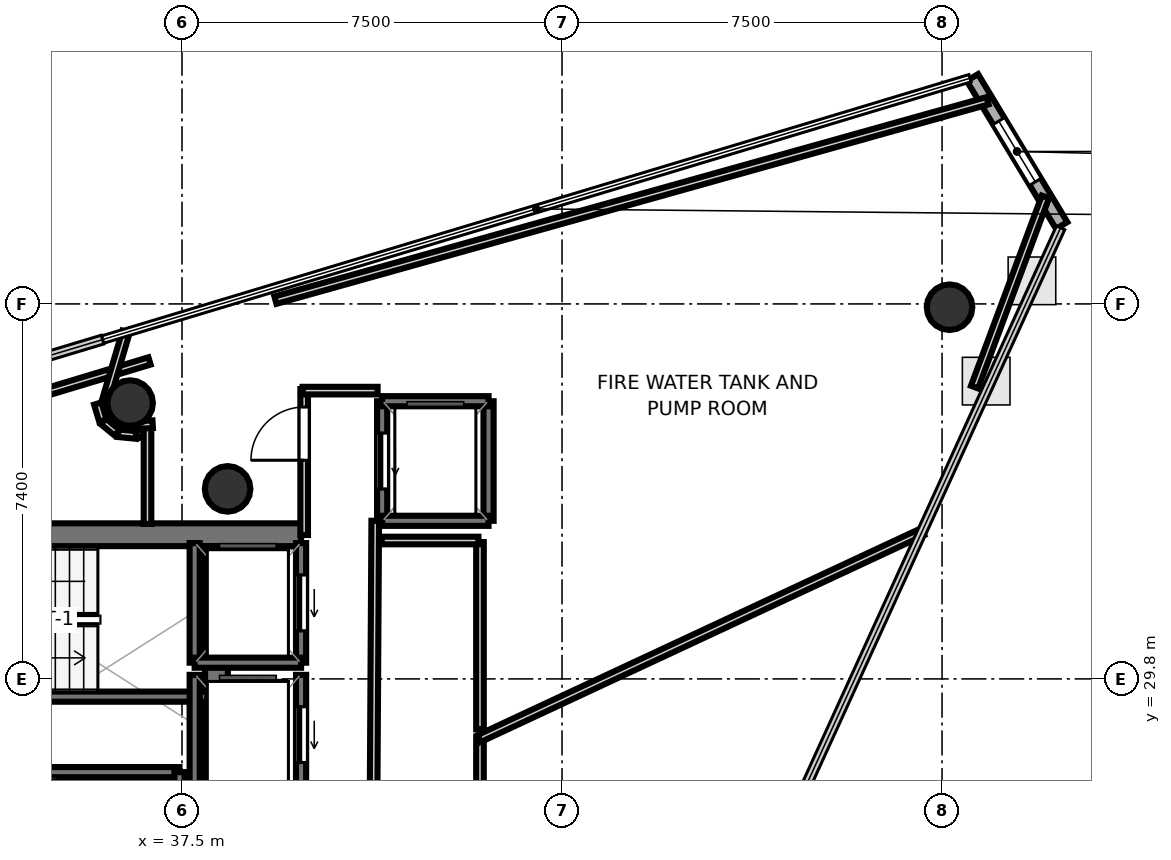
"""IFC4 building model, lengths in metres.
Left out: names, types, materials, properties, quantities, classifications, styles, units other than length and angle.
Written with IfcOpenShell. Run it as: python <this file> out.ifc"""

import sys

from ifc_helpers import new_model, si_unit, direction, frame, frame_2d, origin, origin_2d, place, context, subcontext, project, spatial, rectangle, hollow_circle, extrude, element, fill, save


model = new_model("IFC4")
c1 = context("Model", 3, precision=1e-05, world=origin(), true_north=direction((0.0, 1.0)))
c2 = subcontext(c1, "Body", "Model", "MODEL_VIEW")
j1 = project(units=[si_unit("LENGTHUNIT", "METRE"), si_unit("PLANEANGLEUNIT", "RADIAN")], contexts=[c1])
p1 = place(None, origin())
s1 = spatial("IfcSite", under=j1, at=p1, CompositionType="ELEMENT")
p2 = place(p1, origin())
s2 = spatial("IfcBuilding", under=s1, at=p2, CompositionType="ELEMENT")
p3 = place(p2, frame((0.0, 0.0, 321.3)))
s3 = spatial("IfcBuildingStorey", under=s2, at=p3, CompositionType="ELEMENT", Elevation=321.3)
p4 = place(p3, frame((29.33, 32.645, 0.0), z_axis=(0.0, 0.0, 1.0), x_axis=(1.0, 0.0, 0.0)))
e1 = element("IfcWall", 1, at=p4, inside=s3, PredefinedType="SHEAR", context=c2, shape_type="SweptSolid", body=[
    extrude(rectangle(XDim=10.52, YDim=0.45, at=frame_2d((5.26, 0.0))), origin(), (0.0, 0.0, 1.0), 4.42),
])
p5 = place(p4, frame((0.895, 0.0, 0.0)))
e2 = element("IfcOpeningElement", 2, at=p5, cuts=e1, PredefinedType="OPENING", context=c2, shape_type="SweptSolid", body=[
    extrude(rectangle(XDim=1.25, YDim=2.15, at=frame_2d((0.625, 1.075))), frame((0.0, 0.235, 0.0), z_axis=(0.0, -1.0, 0.0), x_axis=(1.0, 0.0, 0.0)), (0.0, 0.0, 1.0), 0.47),
])
p6 = place(p3, frame((38.18, 24.98, 0.0), z_axis=(0.0, 0.0, 1.0), x_axis=(0.0, 1.0, 0.0)))
e3 = element("IfcWall", 3, at=p6, inside=s3, PredefinedType="SHEAR", context=c2, shape_type="SweptSolid", body=[
    extrude(rectangle(XDim=7.44, YDim=0.45, at=frame_2d((3.72, 0.0))), origin(), (0.0, 0.0, 1.0), 4.42),
])
for number, where, z_axis, x_axis in (
    (4, (38.4, 33.55, 0.0), (0.0, 0.0, 1.0), (1.0, 0.0, 0.0)),
    (5, (52.648, 37.135, 0.0), (0.0, 0.0, 1.0), (1.0, 0.0, 0.0)),
    (6, (36.476, 35.243, 0.0), (0.0, 0.0, 1.0), (1.0, 0.0, 0.0)),
):
    element("IfcColumn", number, at=place(p3, frame(where, z_axis=z_axis, x_axis=x_axis)), inside=s3, PredefinedType="COLUMN", context=c2, shape_type="SweptSolid", body=[
        extrude(hollow_circle(Radius=0.45, WallThickness=0.025, at=origin_2d()), origin(), (0.0, 0.0, 1.0), 4.6),
    ])
p7 = place(p3, frame((54.861, 38.748, 0.0), z_axis=(0.0, 0.0, 1.0), x_axis=(-0.516431513538, 0.856328495278, 0.0)))
e7 = element("IfcWall", 7, at=p7, inside=s3, PredefinedType="SOLIDWALL", context=c2, shape_type="SweptSolid", body=[
    extrude(rectangle(XDim=3.41, YDim=0.26, at=frame_2d((1.705, 0.0))), origin(), (0.0, 0.0, 1.0), 4.42),
])
p8 = place(p7, frame((1.005, 0.0, 1.0)))
e8 = element("IfcOpeningElement", 8, at=p8, cuts=e7, PredefinedType="OPENING", context=c2, shape_type="SweptSolid", body=[
    extrude(rectangle(XDim=1.4, YDim=1.5, at=frame_2d((0.7, 0.75))), frame((0.0, 0.14, 0.0), z_axis=(0.0, -1.0, 0.0), x_axis=(1.0, 0.0, 0.0)), (0.0, 0.0, 1.0), 0.28),
])
p9 = place(p3, frame((29.7, 29.45, 0.0), z_axis=(0.0, 0.0, 1.0), x_axis=(1.0, 0.0, 0.0)))
e9 = element("IfcWall", 9, at=p9, inside=s3, PredefinedType="SOLIDWALL", context=c2, shape_type="SweptSolid", body=[
    extrude(rectangle(XDim=8.3, YDim=0.2, at=frame_2d((4.15, 0.0))), origin(), (0.0, 0.0, 1.0), 4.42),
])
p10 = place(p3, frame((29.7, 27.96, 0.0), z_axis=(0.0, 0.0, 1.0), x_axis=(1.0, 0.0, 0.0)))
e10 = element("IfcWall", 10, at=p10, inside=s3, PredefinedType="SOLIDWALL", context=c2, shape_type="SweptSolid", body=[
    extrude(rectangle(XDim=7.75, YDim=0.2, at=frame_2d((3.875, 0.0))), origin(), (0.0, 0.0, 1.0), 4.42),
])
p11 = place(p3, frame((37.45, 24.9, 0.0), z_axis=(0.0, 0.0, 1.0), x_axis=(0.0, 1.0, 0.0)))
e11 = element("IfcWall", 11, at=p11, inside=s3, PredefinedType="SOLIDWALL", context=c2, shape_type="SweptSolid", body=[
    extrude(rectangle(XDim=3.06, YDim=0.2, at=frame_2d((1.53, 0.0))), origin(), (0.0, 0.0, 1.0), 4.42),
])
p12 = place(p3, frame((39.85, 30.12, 0.0), z_axis=(0.0, 0.0, 1.0), x_axis=(0.0, 1.0, 0.0)))
e12 = element("IfcWall", 12, at=p12, inside=s3, PredefinedType="SOLIDWALL", context=c2, shape_type="SweptSolid", body=[
    extrude(rectangle(XDim=2.36, YDim=0.2, at=frame_2d((1.18, 0.0))), origin(), (0.0, 0.0, 1.0), 4.42),
])
p13 = place(p12, frame((0.63, 0.0, 0.0)))
e13 = element("IfcOpeningElement", 13, at=p13, cuts=e12, PredefinedType="OPENING", context=c2, shape_type="SweptSolid", body=[
    extrude(rectangle(XDim=1.1, YDim=2.15, at=frame_2d((0.55, 1.075))), frame((0.0, 0.11, 0.0), z_axis=(0.0, -1.0, 0.0), x_axis=(1.0, 0.0, 0.0)), (0.0, 0.0, 1.0), 0.22),
])
p14 = place(p3, frame((37.75, 30.12, 0.0), z_axis=(0.0, 0.0, 1.0), x_axis=(0.0, 1.0, 0.0)))
e14 = element("IfcWall", 14, at=p14, inside=s3, PredefinedType="SOLIDWALL", context=c2, shape_type="SweptSolid", body=[
    extrude(rectangle(XDim=2.36, YDim=0.2, at=frame_2d((1.18, 0.0))), origin(), (0.0, 0.0, 1.0), 4.42),
])
p15 = place(p3, frame((37.75, 30.12, 0.0), z_axis=(0.0, 0.0, 1.0), x_axis=(1.0, 0.0, 0.0)))
e15 = element("IfcWall", 15, at=p15, inside=s3, PredefinedType="SOLIDWALL", context=c2, shape_type="SweptSolid", body=[
    extrude(rectangle(XDim=2.1, YDim=0.2, at=frame_2d((1.05, 0.0))), origin(), (0.0, 0.0, 1.0), 4.42),
])
p16 = place(p3, frame((39.85, 27.52, 0.0), z_axis=(0.0, 0.0, 1.0), x_axis=(0.0, 1.0, 0.0)))
e16 = element("IfcWall", 16, at=p16, inside=s3, PredefinedType="SOLIDWALL", context=c2, shape_type="SweptSolid", body=[
    extrude(rectangle(XDim=2.36, YDim=0.2, at=frame_2d((1.18, 0.0))), origin(), (0.0, 0.0, 1.0), 4.42),
])
p17 = place(p16, frame((0.63, 0.0, 0.0)))
e17 = element("IfcOpeningElement", 17, at=p17, cuts=e16, PredefinedType="OPENING", context=c2, shape_type="SweptSolid", body=[
    extrude(rectangle(XDim=1.1, YDim=2.15, at=frame_2d((0.55, 1.075))), frame((0.0, 0.11, 0.0), z_axis=(0.0, -1.0, 0.0), x_axis=(1.0, 0.0, 0.0)), (0.0, 0.0, 1.0), 0.22),
])
p18 = place(p3, frame((37.75, 27.52, 0.0), z_axis=(0.0, 0.0, 1.0), x_axis=(0.0, 1.0, 0.0)))
e18 = element("IfcWall", 18, at=p18, inside=s3, PredefinedType="SOLIDWALL", context=c2, shape_type="SweptSolid", body=[
    extrude(rectangle(XDim=2.36, YDim=0.2, at=frame_2d((1.18, 0.0))), origin(), (0.0, 0.0, 1.0), 4.42),
])
p19 = place(p3, frame((43.55, 32.92, 0.0), z_axis=(0.0, 0.0, 1.0), x_axis=(0.0, 1.0, 0.0)))
e19 = element("IfcWall", 19, at=p19, inside=s3, PredefinedType="SOLIDWALL", context=c2, shape_type="SweptSolid", body=[
    extrude(rectangle(XDim=2.36, YDim=0.2, at=frame_2d((1.18, 0.0))), origin(), (0.0, 0.0, 1.0), 4.42),
])
p20 = place(p3, frame((41.45, 32.92, 0.0), z_axis=(0.0, 0.0, 1.0), x_axis=(0.0, 1.0, 0.0)))
e20 = element("IfcWall", 20, at=p20, inside=s3, PredefinedType="SOLIDWALL", context=c2, shape_type="SweptSolid", body=[
    extrude(rectangle(XDim=2.36, YDim=0.2, at=frame_2d((1.18, 0.0))), origin(), (0.0, 0.0, 1.0), 4.42),
])
p21 = place(p20, frame((0.63, 0.0, 0.0)))
e21 = element("IfcOpeningElement", 21, at=p21, cuts=e20, PredefinedType="OPENING", context=c2, shape_type="SweptSolid", body=[
    extrude(rectangle(XDim=1.1, YDim=2.15, at=frame_2d((0.55, 1.075))), frame((0.0, 0.11, 0.0), z_axis=(0.0, -1.0, 0.0), x_axis=(1.0, 0.0, 0.0)), (0.0, 0.0, 1.0), 0.22),
])
for number, where, z_axis, x_axis in (
    (22, (41.45, 35.28, 0.0), (0.0, 0.0, 1.0), (1.0, 0.0, 0.0)),
    (23, (41.45, 32.92, 0.0), (0.0, 0.0, 1.0), (1.0, 0.0, 0.0)),
):
    element("IfcWall", number, at=place(p3, frame(where, z_axis=z_axis, x_axis=x_axis)), inside=s3, PredefinedType="SOLIDWALL", context=c2, shape_type="SweptSolid", body=[
        extrude(rectangle(XDim=2.1, YDim=0.2, at=frame_2d((1.05, 0.0))), origin(), (0.0, 0.0, 1.0), 4.42),
    ])
p22 = place(p3, frame((35.836, 35.234, 0.0), z_axis=(0.0, 0.0, 1.0), x_axis=(0.29088731233, -0.956757321124, 0.0)))
e24 = element("IfcWall", 24, at=p22, inside=s3, PredefinedType="PARTITIONING", context=c2, shape_type="SweptSolid", body=[
    extrude(rectangle(XDim=0.354, YDim=0.15, at=frame_2d((0.177, 0.0))), origin(), (0.0, 0.0, 1.0), 2.94),
])
p23 = place(p3, frame((35.949, 34.88, 0.0), z_axis=(0.0, 0.0, 1.0), x_axis=(0.77300400279, -0.634401144128, 0.0)))
e25 = element("IfcWall", 25, at=p23, inside=s3, PredefinedType="PARTITIONING", context=c2, shape_type="SweptSolid", body=[
    extrude(rectangle(XDim=0.354, YDim=0.15, at=frame_2d((0.177, 0.0))), origin(), (0.0, 0.0, 1.0), 2.94),
])
p24 = place(p3, frame((36.24, 34.649, 0.0), z_axis=(0.0, 0.0, 1.0), x_axis=(0.995199611942, -0.097865889817, 0.0)))
e26 = element("IfcWall", 26, at=p24, inside=s3, PredefinedType="PARTITIONING", context=c2, shape_type="SweptSolid", body=[
    extrude(rectangle(XDim=0.354, YDim=0.15, at=frame_2d((0.177, 0.0))), origin(), (0.0, 0.0, 1.0), 2.94),
])
p25 = place(p3, frame((36.608, 34.617, 0.0), z_axis=(0.0, 0.0, 1.0), x_axis=(0.90494499914, 0.425528551957, 0.0)))
e27 = element("IfcWall", 27, at=p25, inside=s3, PredefinedType="PARTITIONING", context=c2, shape_type="SweptSolid", body=[
    extrude(rectangle(XDim=0.131, YDim=0.15, at=frame_2d((0.066, 0.0))), origin(), (0.0, 0.0, 1.0), 2.94),
])
p26 = place(p3, frame((36.819, 34.765, 0.0), z_axis=(0.0, 0.0, 1.0), x_axis=(0.0, -1.0, 0.0)))
e28 = element("IfcWall", 28, at=p26, inside=s3, PredefinedType="PARTITIONING", context=c2, shape_type="SweptSolid", body=[
    extrude(rectangle(XDim=1.907, YDim=0.15, at=frame_2d((0.953, 0.0))), origin(), (0.0, 0.0, 1.0), 2.94),
])
p27 = place(p3, frame((29.759, 33.935, 0.0), z_axis=(0.0, 0.0, 1.0), x_axis=(0.957477622137, 0.288507544281, 0.0)))
e29 = element("IfcWall", 29, at=p27, inside=s3, PredefinedType="PARTITIONING", context=c2, shape_type="SweptSolid", body=[
    extrude(rectangle(XDim=7.416, YDim=0.15, at=frame_2d((3.708, 0.0))), origin(), (0.0, 0.0, 1.0), 2.94),
])
p28 = place(p3, frame((39.911, 32.64, 0.0), z_axis=(0.0, 0.0, 1.0), x_axis=(0.0, 1.0, 0.0)))
e30 = element("IfcWall", 30, at=p28, inside=s3, PredefinedType="PARTITIONING", context=c2, shape_type="SweptSolid", body=[
    extrude(rectangle(XDim=2.88, YDim=0.15, at=frame_2d((1.44, 0.0))), origin(), (0.0, 0.0, 1.0), 2.94),
])
p29 = place(p28, frame((1.475, 0.0, 0.0)))
e31 = element("IfcOpeningElement", 31, at=p29, cuts=e30, PredefinedType="OPENING", context=c2, shape_type="SweptSolid", body=[
    extrude(rectangle(XDim=1.05, YDim=2.15, at=frame_2d((0.525, 1.075))), frame((0.0, 0.085, 0.0), z_axis=(0.0, -1.0, 0.0), x_axis=(1.0, 0.0, 0.0)), (0.0, 0.0, 1.0), 0.17),
])
p30 = place(p3, frame((39.88, 35.489, 0.0), z_axis=(0.0, 0.0, 1.0), x_axis=(1.0, 0.0, 0.0)))
e32 = element("IfcWall", 32, at=p30, inside=s3, PredefinedType="PARTITIONING", context=c2, shape_type="SweptSolid", body=[
    extrude(rectangle(XDim=1.48, YDim=0.15, at=frame_2d((0.74, 0.0))), origin(), (0.0, 0.0, 1.0), 2.94),
])
p31 = place(p3, frame((41.313, 32.92, 0.0), z_axis=(0.0, 0.0, 1.0), x_axis=(-0.005942518022, -0.999982343084, 0.0)))
e33 = element("IfcWall", 33, at=p31, inside=s3, PredefinedType="PARTITIONING", context=c2, shape_type="SweptSolid", body=[
    extrude(rectangle(XDim=8.34, YDim=0.15, at=frame_2d((4.17, 0.0))), origin(), (0.0, 0.0, 1.0), 2.94),
])
p32 = place(p3, frame((43.381, 24.85, 0.0), z_axis=(0.0, 0.0, 1.0), x_axis=(0.0, 1.0, 0.0)))
e34 = element("IfcWall", 34, at=p32, inside=s3, PredefinedType="PARTITIONING", context=c2, shape_type="SweptSolid", body=[
    extrude(rectangle(XDim=3.801, YDim=0.15, at=frame_2d((1.9, 0.0))), origin(), (0.0, 0.0, 1.0), 2.94),
])
p33 = place(p3, frame((43.363, 28.623, 0.0), z_axis=(0.0, 0.0, 1.0), x_axis=(0.906306431774, 0.422621168099, 0.0)))
e35 = element("IfcWall", 35, at=p33, inside=s3, PredefinedType="PARTITIONING", context=c2, shape_type="SweptSolid", body=[
    extrude(rectangle(XDim=9.659, YDim=0.15, at=frame_2d((4.83, 0.0))), origin(), (0.0, 0.0, 1.0), 2.94),
])
p34 = place(p3, frame((36.922, 34.827, 0.0), z_axis=(0.0, 0.0, 1.0), x_axis=(-0.998076926927, -0.061987482097, 0.0)))
e36 = element("IfcWall", 36, at=p34, inside=s3, PredefinedType="PARTITIONING", context=c2, shape_type="SweptSolid", body=[
    extrude(rectangle(XDim=0.311, YDim=0.15, at=frame_2d((0.156, 0.0))), origin(), (0.0, 0.0, 1.0), 2.94),
])
p35 = place(p3, frame((35.977, 35.23, 0.0), z_axis=(0.0, 0.0, 1.0), x_axis=(0.283119181647, 0.959084735038, 0.0)))
e37 = element("IfcWall", 37, at=p35, inside=s3, PredefinedType="PARTITIONING", context=c2, shape_type="SweptSolid", body=[
    extrude(rectangle(XDim=1.484, YDim=0.15, at=frame_2d((0.742, 0.0))), origin(), (0.0, 0.0, 1.0), 2.94),
])
p36 = place(p3, frame((39.344, 37.273, 0.0), z_axis=(0.0, 0.0, 1.0), x_axis=(0.96295429031, 0.269664670976, 0.0)))
e38 = element("IfcWall", 38, at=p36, inside=s3, PredefinedType="PARTITIONING", context=c2, shape_type="SweptSolid", body=[
    extrude(rectangle(XDim=14.595, YDim=0.15, at=frame_2d((7.298, 0.0))), origin(), (0.0, 0.0, 1.0), 2.94),
])
p37 = place(p3, frame((54.54, 39.312, 0.0), z_axis=(0.0, 0.0, 1.0), x_axis=(-0.34907858758, -0.93709345302, 0.0)))
e39 = element("IfcWall", 39, at=p37, inside=s3, PredefinedType="PARTITIONING", context=c2, shape_type="SweptSolid", body=[
    extrude(rectangle(XDim=4.005, YDim=0.15, at=frame_2d((2.003, 0.0))), origin(), (0.0, 0.0, 1.0), 2.94),
])
p38 = place(p3, frame((43.381, 28.805, 0.0), z_axis=(0.0, 0.0, 1.0), x_axis=(0.0, 1.0, 0.0)))
e40 = element("IfcWall", 40, at=p38, inside=s3, PredefinedType="PARTITIONING", context=c2, shape_type="SweptSolid", body=[
    extrude(rectangle(XDim=3.695, YDim=0.15, at=frame_2d((1.847, 0.0))), origin(), (0.0, 0.0, 1.0), 2.94),
])
p39 = place(p3, frame((43.35, 32.531, 0.0), z_axis=(0.0, 0.0, 1.0), x_axis=(-1.0, 0.0, 0.0)))
e41 = element("IfcWall", 41, at=p39, inside=s3, PredefinedType="PARTITIONING", context=c2, shape_type="SweptSolid", body=[
    extrude(rectangle(XDim=1.91, YDim=0.15, at=frame_2d((0.955, 0.0))), origin(), (0.0, 0.0, 1.0), 2.94),
])
p40 = place(p13, origin())
e42 = element("IfcDoor", 42, at=p40, inside=s3, OperationType="SLIDING_TO_LEFT", PredefinedType="DOOR", context=c2, shape_type="SweptSolid", body=[
    extrude(rectangle(XDim=1.1, YDim=2.15, at=frame_2d((0.55, 1.075))), frame((0.0, 0.025, 0.0), z_axis=(0.0, -1.0, 0.0), x_axis=(1.0, 0.0, 0.0)), (0.0, 0.0, 1.0), 0.05),
])
fill(e13, e42)
p41 = place(p17, origin())
e43 = element("IfcDoor", 43, at=p41, inside=s3, OperationType="SLIDING_TO_LEFT", PredefinedType="DOOR", context=c2, shape_type="SweptSolid", body=[
    extrude(rectangle(XDim=1.1, YDim=2.15, at=frame_2d((0.55, 1.075))), frame((0.0, 0.025, 0.0), z_axis=(0.0, -1.0, 0.0), x_axis=(1.0, 0.0, 0.0)), (0.0, 0.0, 1.0), 0.05),
])
fill(e17, e43)
p42 = place(p21, origin())
e44 = element("IfcDoor", 44, at=p42, inside=s3, OperationType="SLIDING_TO_LEFT", PredefinedType="DOOR", context=c2, shape_type="SweptSolid", body=[
    extrude(rectangle(XDim=1.1, YDim=2.15, at=frame_2d((0.55, 1.075))), frame((0.0, 0.025, 0.0), z_axis=(0.0, -1.0, 0.0), x_axis=(1.0, 0.0, 0.0)), (0.0, 0.0, 1.0), 0.05),
])
fill(e21, e44)
p43 = place(p29, origin())
e45 = element("IfcDoor", 45, at=p43, inside=s3, OperationType="SINGLE_SWING_LEFT", PredefinedType="DOOR", context=c2, shape_type="SweptSolid", body=[
    extrude(rectangle(XDim=1.05, YDim=2.15, at=frame_2d((0.525, 1.075))), frame((0.0, 0.025, 0.0), z_axis=(0.0, -1.0, 0.0), x_axis=(1.0, 0.0, 0.0)), (0.0, 0.0, 1.0), 0.05),
])
fill(e31, e45)
p44 = place(p8, origin())
e46 = element("IfcWindow", 46, at=p44, inside=s3, PartitioningType="SINGLE_PANEL", PredefinedType="WINDOW", context=c2, shape_type="SweptSolid", body=[
    extrude(rectangle(XDim=1.4, YDim=1.5, at=frame_2d((0.7, 0.75))), frame((0.0, 0.03, 0.0), z_axis=(0.0, -1.0, 0.0), x_axis=(1.0, 0.0, 0.0)), (0.0, 0.0, 1.0), 0.06),
])
fill(e8, e46)
save(model, sys.argv[1])
